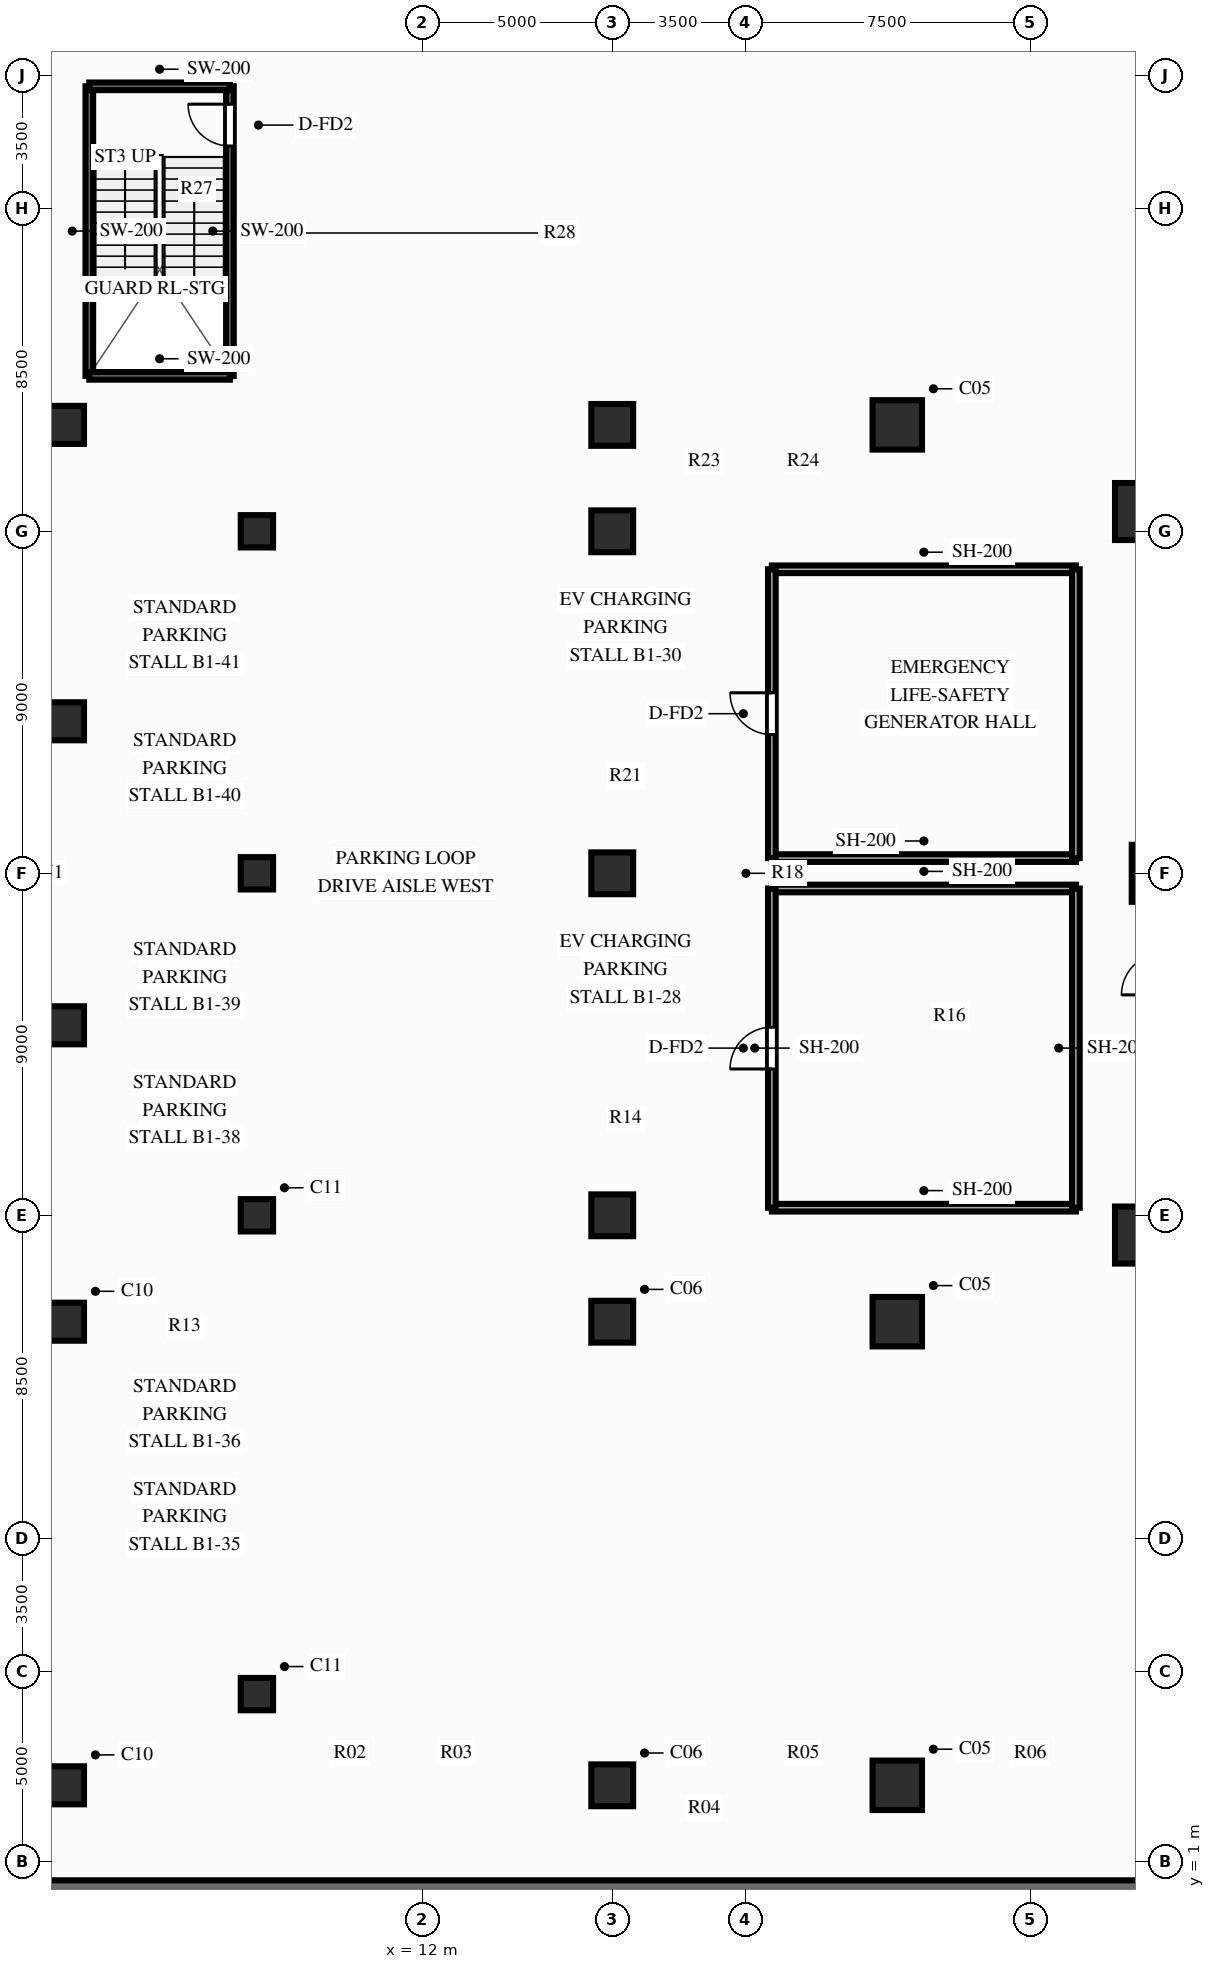
"""IFC4 building model, lengths in metres.
Left out: names, types, materials, properties, quantities, classifications, styles, units other than length and angle.
Written with IfcOpenShell. Run it as: python <this file> out.ifc"""

import sys

from ifc_helpers import new_model, si_unit, direction, frame, frame_2d, origin, origin_2d, place, context, subcontext, project, spatial, rectangle, circle, extrude, source, transform, mapped, element, fill, save


model = new_model("IFC4")
c1 = context("Model", 3, precision=1e-05, world=origin(), true_north=direction((0.0, 1.0)))
c2 = subcontext(c1, "Body", "Model", "MODEL_VIEW")
j1 = project(units=[si_unit("LENGTHUNIT", "METRE"), si_unit("PLANEANGLEUNIT", "RADIAN")], contexts=[c1])
p1 = place(None, origin())
s1 = spatial("IfcSite", under=j1, at=p1, CompositionType="ELEMENT")
p2 = place(p1, origin())
s2 = spatial("IfcBuilding", under=s1, at=p2, CompositionType="ELEMENT")
p3 = place(p2, frame((0.0, 0.0, -4.6)))
s3 = spatial("IfcBuildingStorey", under=s2, at=p3, CompositionType="ELEMENT", Elevation=-4.6)
p4 = place(p3, frame((0.25, 0.25, 0.0), z_axis=(0.0, 0.0, 1.0), x_axis=(1.0, 0.0, 0.0)))
e1 = element("IfcWall", 1, at=p4, inside=s3, PredefinedType="USERDEFINED", context=c2, shape_type="SweptSolid", body=[
    extrude(rectangle(XDim=75.5, YDim=0.5, at=frame_2d((37.75, 0.0))), origin(), (0.0, 0.0, 1.0), 4.6),
])
m1 = source(origin(), c2, "Body", "SweptSolid", [
    extrude(rectangle(XDim=1.5, YDim=1.5, at=origin_2d()), origin(), (0.0, 0.0, 1.0), 4.6),
])
for number, where, z_axis, x_axis in (
    (2, (30.98, 17.48, 0.0), (0.0, 0.0, 1.0), (1.0, 0.0, 0.0)),
    (3, (30.98, 36.52, 0.0), (0.0, 0.0, 1.0), (1.0, 0.0, 0.0)),
    (4, (31.42, 27.0, 0.0), (0.0, 0.0, 1.0), (1.0, 0.0, 0.0)),
):
    element("IfcColumn", number, at=place(p3, frame(where, z_axis=z_axis, x_axis=x_axis)), inside=s3, PredefinedType="COLUMN", context=c2, shape_type="MappedRepresentation", body=[
        mapped(m1, transform((0.0, 0.0, 0.0), scale=1.0)),
    ])
m2 = source(origin(), c2, "Body", "SweptSolid", [
    extrude(circle(Radius=0.5, at=origin_2d()), origin(), (0.0, 0.0, 1.0), 4.6),
])
for number, where, z_axis, x_axis in (
    (5, (2.6, 3.0, 0.0), (0.0, 0.0, 1.0), (1.0, 0.0, 0.0)),
    (6, (2.6, 15.2, 0.0), (0.0, 0.0, 1.0), (1.0, 0.0, 0.0)),
    (7, (2.6, 23.0, 0.0), (0.0, 0.0, 1.0), (1.0, 0.0, 0.0)),
    (8, (2.6, 31.0, 0.0), (0.0, 0.0, 1.0), (1.0, 0.0, 0.0)),
    (9, (2.6, 38.8, 0.0), (0.0, 0.0, 1.0), (1.0, 0.0, 0.0)),
):
    element("IfcColumn", number, at=place(p3, frame(where, z_axis=z_axis, x_axis=x_axis)), inside=s3, PredefinedType="COLUMN", context=c2, shape_type="MappedRepresentation", body=[
        mapped(m2, transform((0.0, 0.0, 0.0), scale=1.0)),
    ])
m3 = source(origin(), c2, "Body", "SweptSolid", [
    extrude(circle(Radius=0.425, at=origin_2d()), origin(), (0.0, 0.0, 1.0), 4.6),
])
for number, where, z_axis, x_axis in (
    (10, (7.65, 5.4, 0.0), (0.0, 0.0, 1.0), (1.0, 0.0, 0.0)),
    (11, (7.65, 18.0, 0.0), (0.0, 0.0, 1.0), (1.0, 0.0, 0.0)),
    (12, (7.65, 27.0, 0.0), (0.0, 0.0, 1.0), (1.0, 0.0, 0.0)),
    (13, (7.65, 36.0, 0.0), (0.0, 0.0, 1.0), (1.0, 0.0, 0.0)),
):
    element("IfcColumn", number, at=place(p3, frame(where, z_axis=z_axis, x_axis=x_axis)), inside=s3, PredefinedType="COLUMN", context=c2, shape_type="MappedRepresentation", body=[
        mapped(m3, transform((0.0, 0.0, 0.0), scale=1.0)),
    ])
m4 = source(origin(), c2, "Body", "SweptSolid", [
    extrude(rectangle(XDim=1.1, YDim=1.1, at=origin_2d()), origin(), (0.0, 0.0, 1.0), 4.6),
])
for number, where, z_axis, x_axis in (
    (14, (17.0, 3.0, 0.0), (0.0, 0.0, 1.0), (1.0, 0.0, 0.0)),
    (15, (17.0, 15.2, 0.0), (0.0, 0.0, 1.0), (1.0, 0.0, 0.0)),
    (16, (17.0, 18.0, 0.0), (0.0, 0.0, 1.0), (1.0, 0.0, 0.0)),
    (17, (17.0, 27.0, 0.0), (0.0, 0.0, 1.0), (1.0, 0.0, 0.0)),
    (18, (17.0, 36.0, 0.0), (0.0, 0.0, 1.0), (1.0, 0.0, 0.0)),
    (19, (17.0, 38.8, 0.0), (0.0, 0.0, 1.0), (1.0, 0.0, 0.0)),
):
    element("IfcColumn", number, at=place(p3, frame(where, z_axis=z_axis, x_axis=x_axis)), inside=s3, PredefinedType="COLUMN", context=c2, shape_type="MappedRepresentation", body=[
        mapped(m4, transform((0.0, 0.0, 0.0), scale=1.0)),
    ])
m5 = source(origin(), c2, "Body", "SweptSolid", [
    extrude(rectangle(XDim=1.3, YDim=1.3, at=origin_2d()), origin(), (0.0, 0.0, 1.0), 4.6),
])
for number, where, z_axis, x_axis in (
    (20, (24.5, 3.0, 0.0), (0.0, 0.0, 1.0), (1.0, 0.0, 0.0)),
    (21, (24.5, 15.2, 0.0), (0.0, 0.0, 1.0), (1.0, 0.0, 0.0)),
    (22, (24.5, 38.8, 0.0), (0.0, 0.0, 1.0), (1.0, 0.0, 0.0)),
):
    element("IfcColumn", number, at=place(p3, frame(where, z_axis=z_axis, x_axis=x_axis)), inside=s3, PredefinedType="COLUMN", context=c2, shape_type="MappedRepresentation", body=[
        mapped(m5, transform((0.0, 0.0, 0.0), scale=1.0)),
    ])
p5 = place(p3, frame((3.24, 40.09, 0.0), z_axis=(0.0, 0.0, 1.0), x_axis=(0.0, 1.0, 0.0)))
e23 = element("IfcWall", 23, at=p5, inside=s3, PredefinedType="SOLIDWALL", context=c2, shape_type="SweptSolid", body=[
    extrude(rectangle(XDim=7.62, YDim=0.2, at=frame_2d((3.81, 0.0))), origin(), (0.0, 0.0, 1.0), 4.32),
])
p6 = place(p3, frame((6.94, 40.09, 0.0), z_axis=(0.0, 0.0, 1.0), x_axis=(0.0, 1.0, 0.0)))
e24 = element("IfcWall", 24, at=p6, inside=s3, PredefinedType="SOLIDWALL", context=c2, shape_type="SweptSolid", body=[
    extrude(rectangle(XDim=7.62, YDim=0.2, at=frame_2d((3.81, 0.0))), origin(), (0.0, 0.0, 1.0), 4.32),
])
p7 = place(p6, frame((7.15, 0.0, 0.0), z_axis=(0.0, 0.0, 1.0), x_axis=(-1.0, 0.0, 0.0)))
e25 = element("IfcOpeningElement", 25, at=p7, cuts=e24, PredefinedType="OPENING", context=c2, shape_type="SweptSolid", body=[
    extrude(rectangle(XDim=1.1, YDim=2.15, at=frame_2d((0.55, 1.075))), frame((0.0, 0.112, 0.0), z_axis=(0.0, -1.0, 0.0), x_axis=(1.0, 0.0, 0.0)), (0.0, 0.0, 1.0), 0.224),
])
for number, where, z_axis, x_axis in (
    (26, (3.24, 40.09, 0.0), (0.0, 0.0, 1.0), (1.0, 0.0, 0.0)),
    (27, (3.24, 47.71, 0.0), (0.0, 0.0, 1.0), (1.0, 0.0, 0.0)),
):
    element("IfcWall", number, at=place(p3, frame(where, z_axis=z_axis, x_axis=x_axis)), inside=s3, PredefinedType="SOLIDWALL", context=c2, shape_type="SweptSolid", body=[
        extrude(rectangle(XDim=3.7, YDim=0.2, at=frame_2d((1.85, 0.0))), origin(), (0.0, 0.0, 1.0), 4.32),
    ])
for number, where, z_axis, x_axis in (
    (28, (21.2, 18.2, 0.0), (0.0, 0.0, 1.0), (1.0, 0.0, 0.0)),
    (29, (21.2, 26.6, 0.0), (0.0, 0.0, 1.0), (1.0, 0.0, 0.0)),
):
    element("IfcWall", number, at=place(p3, frame(where, z_axis=z_axis, x_axis=x_axis)), inside=s3, PredefinedType="PARTITIONING", context=c2, shape_type="SweptSolid", body=[
        extrude(rectangle(XDim=8.0, YDim=0.2, at=frame_2d((4.0, 0.0))), origin(), (0.0, 0.0, 1.0), 4.32),
    ])
p8 = place(p3, frame((21.2, 18.2, 0.0), z_axis=(0.0, 0.0, 1.0), x_axis=(0.0, 1.0, 0.0)))
e30 = element("IfcWall", 30, at=p8, inside=s3, PredefinedType="PARTITIONING", context=c2, shape_type="SweptSolid", body=[
    extrude(rectangle(XDim=8.4, YDim=0.2, at=frame_2d((4.2, 0.0))), origin(), (0.0, 0.0, 1.0), 4.32),
])
p9 = place(p8, frame((3.65, 0.0, 0.0)))
e31 = element("IfcOpeningElement", 31, at=p9, cuts=e30, PredefinedType="OPENING", context=c2, shape_type="SweptSolid", body=[
    extrude(rectangle(XDim=1.1, YDim=2.15, at=frame_2d((0.55, 1.075))), frame((0.0, 0.112, 0.0), z_axis=(0.0, -1.0, 0.0), x_axis=(1.0, 0.0, 0.0)), (0.0, 0.0, 1.0), 0.224),
])
p10 = place(p3, frame((29.2, 18.2, 0.0), z_axis=(0.0, 0.0, 1.0), x_axis=(0.0, 1.0, 0.0)))
e32 = element("IfcWall", 32, at=p10, inside=s3, PredefinedType="PARTITIONING", context=c2, shape_type="SweptSolid", body=[
    extrude(rectangle(XDim=8.4, YDim=0.2, at=frame_2d((4.2, 0.0))), origin(), (0.0, 0.0, 1.0), 4.32),
])
for number, where, z_axis, x_axis in (
    (33, (21.2, 27.4, 0.0), (0.0, 0.0, 1.0), (1.0, 0.0, 0.0)),
    (34, (21.2, 35.0, 0.0), (0.0, 0.0, 1.0), (1.0, 0.0, 0.0)),
):
    element("IfcWall", number, at=place(p3, frame(where, z_axis=z_axis, x_axis=x_axis)), inside=s3, PredefinedType="PARTITIONING", context=c2, shape_type="SweptSolid", body=[
        extrude(rectangle(XDim=8.0, YDim=0.2, at=frame_2d((4.0, 0.0))), origin(), (0.0, 0.0, 1.0), 4.32),
    ])
p11 = place(p3, frame((21.2, 27.4, 0.0), z_axis=(0.0, 0.0, 1.0), x_axis=(0.0, 1.0, 0.0)))
e35 = element("IfcWall", 35, at=p11, inside=s3, PredefinedType="PARTITIONING", context=c2, shape_type="SweptSolid", body=[
    extrude(rectangle(XDim=7.6, YDim=0.2, at=frame_2d((3.8, 0.0))), origin(), (0.0, 0.0, 1.0), 4.32),
])
p12 = place(p11, frame((3.25, 0.0, 0.0)))
e36 = element("IfcOpeningElement", 36, at=p12, cuts=e35, PredefinedType="OPENING", context=c2, shape_type="SweptSolid", body=[
    extrude(rectangle(XDim=1.1, YDim=2.15, at=frame_2d((0.55, 1.075))), frame((0.0, 0.112, 0.0), z_axis=(0.0, -1.0, 0.0), x_axis=(1.0, 0.0, 0.0)), (0.0, 0.0, 1.0), 0.224),
])
p13 = place(p3, frame((29.2, 27.4, 0.0), z_axis=(0.0, 0.0, 1.0), x_axis=(0.0, 1.0, 0.0)))
e37 = element("IfcWall", 37, at=p13, inside=s3, PredefinedType="PARTITIONING", context=c2, shape_type="SweptSolid", body=[
    extrude(rectangle(XDim=7.6, YDim=0.2, at=frame_2d((3.8, 0.0))), origin(), (0.0, 0.0, 1.0), 4.32),
])
m6 = source(origin(), c2, "Body", "SweptSolid", [
    extrude(rectangle(XDim=1.1, YDim=2.15, at=frame_2d((0.55, 1.075))), frame((0.0, 0.025, 0.0), z_axis=(0.0, -1.0, 0.0), x_axis=(1.0, 0.0, 0.0)), (0.0, 0.0, 1.0), 0.05),
])
p14 = place(p7, origin())
e38 = element("IfcDoor", 38, at=p14, inside=s3, OperationType="SINGLE_SWING_LEFT", PredefinedType="DOOR", context=c2, shape_type="MappedRepresentation", body=[
    mapped(m6, transform((0.0, 0.0, 0.0), scale=1.0)),
])
fill(e25, e38)
p15 = place(p9, origin())
e39 = element("IfcDoor", 39, at=p15, inside=s3, OperationType="SINGLE_SWING_LEFT", PredefinedType="DOOR", context=c2, shape_type="MappedRepresentation", body=[
    mapped(m6, transform((0.0, 0.0, 0.0), scale=1.0)),
])
fill(e31, e39)
p16 = place(p12, origin())
e40 = element("IfcDoor", 40, at=p16, inside=s3, OperationType="SINGLE_SWING_RIGHT", PredefinedType="DOOR", context=c2, shape_type="MappedRepresentation", body=[
    mapped(m6, transform((0.0, 0.0, 0.0), scale=1.0)),
])
fill(e36, e40)
save(model, sys.argv[1])
